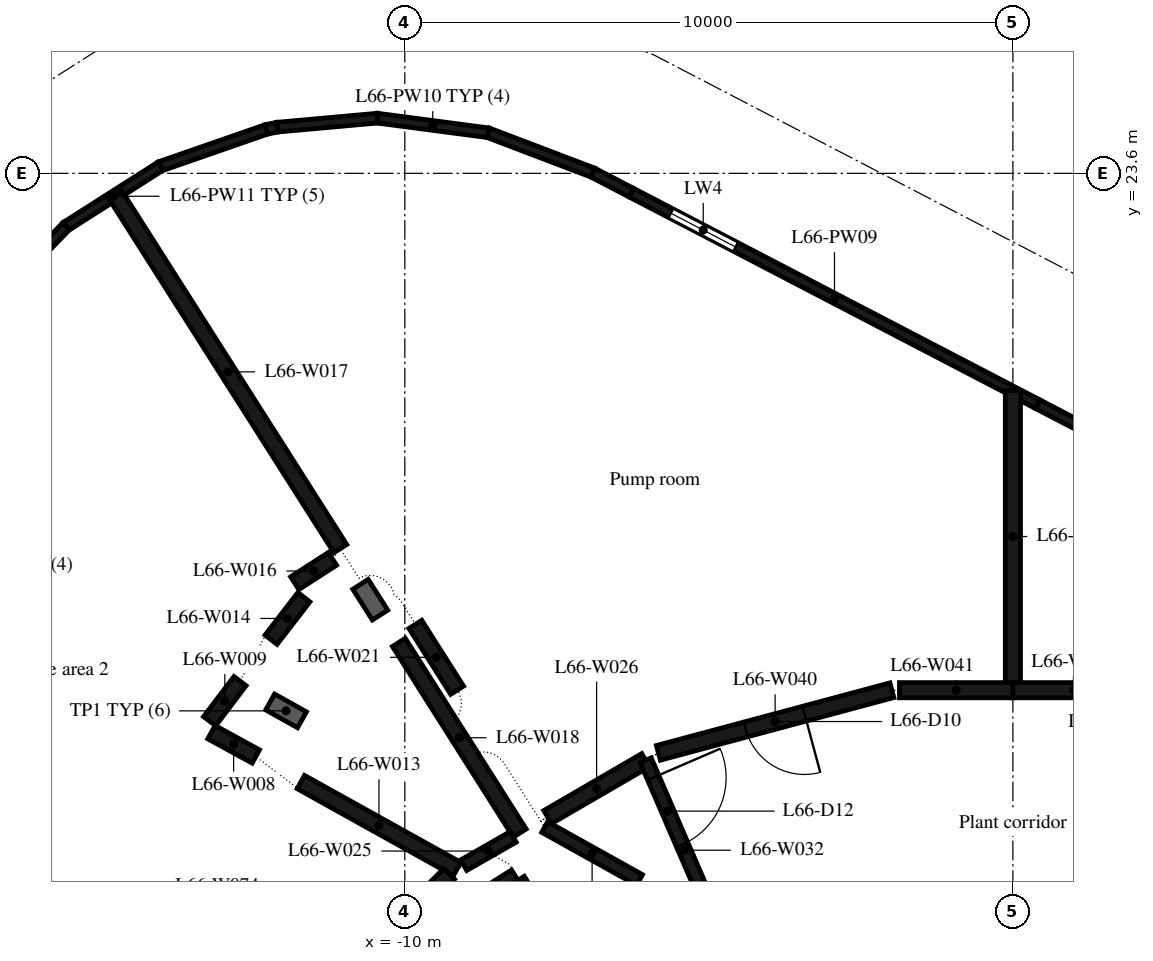
"""IFC4 building model, lengths in metres.
Left out: names, types, materials, properties, quantities, classifications, styles, units other than length and angle.
Written with IfcOpenShell. Run it as: python <this file> out.ifc"""

import sys

from ifc_helpers import new_model, si_unit, direction, frame, frame_2d, origin, place, context, subcontext, project, spatial, rectangle, extrude, element, fill, save


model = new_model("IFC4")
c1 = context("Model", 3, precision=1e-05, world=origin(), true_north=direction((0.0, 1.0)))
c2 = subcontext(c1, "Body", "Model", "MODEL_VIEW")
j1 = project(units=[si_unit("LENGTHUNIT", "METRE"), si_unit("PLANEANGLEUNIT", "RADIAN")], contexts=[c1])
p1 = place(None, origin())
s1 = spatial("IfcSite", under=j1, at=p1, CompositionType="ELEMENT")
p2 = place(p1, origin())
s2 = spatial("IfcBuilding", under=s1, at=p2, CompositionType="ELEMENT")
p3 = place(p2, frame((0.0, 0.0, 258.2)))
s3 = spatial("IfcBuildingStorey", under=s2, at=p3, CompositionType="ELEMENT", Elevation=258.2)
p4 = place(p3, frame((7.085, 16.328, 0.0), z_axis=(0.0, 0.0, 1.0), x_axis=(-0.887019775052, 0.46173143565, 0.0)))
e1 = element("IfcWall", 1, at=p4, inside=s3, PredefinedType="STANDARD", context=c2, shape_type="SweptSolid", body=[
    extrude(rectangle(XDim=7.53, YDim=0.16, at=frame_2d((3.765, 0.0))), origin(), (0.0, 0.0, 1.0), 4.75),
])
p5 = place(p4, frame((2.265, 0.0, 1.0)))
e2 = element("IfcOpeningElement", 2, at=p5, cuts=e1, PredefinedType="OPENING", context=c2, shape_type="SweptSolid", body=[
    extrude(rectangle(XDim=3.0, YDim=2.2, at=frame_2d((1.5, 1.1))), frame((0.0, 0.09, 0.0), z_axis=(0.0, -1.0, 0.0), x_axis=(1.0, 0.0, 0.0)), (0.0, 0.0, 1.0), 0.18),
])
p6 = place(p3, frame((0.406, 19.805, 0.0), z_axis=(0.0, 0.0, 1.0), x_axis=(-0.88700649569, 0.461756945377, 0.0)))
e3 = element("IfcWall", 3, at=p6, inside=s3, PredefinedType="STANDARD", context=c2, shape_type="SweptSolid", body=[
    extrude(rectangle(XDim=7.53, YDim=0.16, at=frame_2d((3.765, 0.0))), origin(), (0.0, 0.0, 1.0), 4.75),
])
p7 = place(p6, frame((5.598, 0.0, 1.0)))
e4 = element("IfcOpeningElement", 4, at=p7, cuts=e3, PredefinedType="OPENING", context=c2, shape_type="SweptSolid", body=[
    extrude(rectangle(XDim=1.2, YDim=2.2, at=frame_2d((0.6, 1.1))), frame((0.0, 0.09, 0.0), z_axis=(0.0, -1.0, 0.0), x_axis=(1.0, 0.0, 0.0)), (0.0, 0.0, 1.0), 0.18),
])
p8 = place(p3, frame((-6.274, 23.282, 0.0), z_axis=(0.0, 0.0, 1.0), x_axis=(-0.887061476856, 0.461651314607, 0.0)))
e5 = element("IfcWall", 5, at=p8, inside=s3, PredefinedType="STANDARD", context=c2, shape_type="SweptSolid", body=[
    extrude(rectangle(XDim=0.721, YDim=0.16, at=frame_2d((0.36, 0.0))), origin(), (0.0, 0.0, 1.0), 4.75),
])
p9 = place(p3, frame((-6.909, 23.613, 0.0), z_axis=(0.0, 0.0, 1.0), x_axis=(-0.934628033196, 0.355626826272, 0.0)))
e6 = element("IfcWall", 6, at=p9, inside=s3, PredefinedType="STANDARD", context=c2, shape_type="SweptSolid", body=[
    extrude(rectangle(XDim=1.846, YDim=0.16, at=frame_2d((0.923, 0.0))), origin(), (0.0, 0.0, 1.0), 4.75),
])
p10 = place(p3, frame((-8.625, 24.267, 0.0), z_axis=(0.0, 0.0, 1.0), x_axis=(-0.991428647281, 0.130649291427, 0.0)))
e7 = element("IfcWall", 7, at=p10, inside=s3, PredefinedType="STANDARD", context=c2, shape_type="SweptSolid", body=[
    extrude(rectangle(XDim=1.848, YDim=0.16, at=frame_2d((0.924, 0.0))), origin(), (0.0, 0.0, 1.0), 4.75),
])
p11 = place(p3, frame((-10.448, 24.508, 0.0), z_axis=(0.0, 0.0, 1.0), x_axis=(-0.995950985293, -0.089897913736, 0.0)))
e8 = element("IfcWall", 8, at=p11, inside=s3, PredefinedType="STANDARD", context=c2, shape_type="SweptSolid", body=[
    extrude(rectangle(XDim=1.656, YDim=0.16, at=frame_2d((0.828, 0.0))), origin(), (0.0, 0.0, 1.0), 4.75),
])
p12 = place(p3, frame((-12.098, 24.359, 0.0), z_axis=(0.0, 0.0, 1.0), x_axis=(-0.978969744076, -0.204005490574, 0.0)))
e9 = element("IfcWall", 9, at=p12, inside=s3, PredefinedType="STANDARD", context=c2, shape_type="SweptSolid", body=[
    extrude(rectangle(XDim=0.19, YDim=0.16, at=frame_2d((0.095, 0.0))), origin(), (0.0, 0.0, 1.0), 4.75),
])
p13 = place(p3, frame((-12.28, 24.322, 0.0), z_axis=(0.0, 0.0, 1.0), x_axis=(-0.944559218064, -0.328341108561, 0.0)))
e10 = element("IfcWall", 10, at=p13, inside=s3, PredefinedType="STANDARD", context=c2, shape_type="SweptSolid", body=[
    extrude(rectangle(XDim=1.846, YDim=0.16, at=frame_2d((0.923, 0.0))), origin(), (0.0, 0.0, 1.0), 4.75),
])
p14 = place(p3, frame((-14.015, 23.719, 0.0), z_axis=(0.0, 0.0, 1.0), x_axis=(-0.843373106488, -0.537328394236, 0.0)))
e11 = element("IfcWall", 11, at=p14, inside=s3, PredefinedType="STANDARD", context=c2, shape_type="SweptSolid", body=[
    extrude(rectangle(XDim=1.848, YDim=0.16, at=frame_2d((0.924, 0.0))), origin(), (0.0, 0.0, 1.0), 4.75),
])
p15 = place(p3, frame((-15.567, 22.732, 0.0), z_axis=(0.0, 0.0, 1.0), x_axis=(-0.696715693366, -0.71734736538, 0.0)))
e12 = element("IfcWall", 12, at=p15, inside=s3, PredefinedType="STANDARD", context=c2, shape_type="SweptSolid", body=[
    extrude(rectangle(XDim=1.846, YDim=0.16, at=frame_2d((0.923, 0.0))), origin(), (0.0, 0.0, 1.0), 4.75),
])
p16 = place(p3, frame((-13.18, 14.41, 0.0), z_axis=(0.0, 0.0, 1.0), x_axis=(0.877019761318, -0.480454304026, 0.0)))
e13 = element("IfcWall", 13, at=p16, inside=s3, PredefinedType="PARTITIONING", context=c2, shape_type="SweptSolid", body=[
    extrude(rectangle(XDim=0.832, YDim=0.25, at=frame_2d((0.416, 0.0))), origin(), (0.0, 0.0, 1.0), 4.75),
])
p17 = place(p3, frame((-12.71, 15.25, 0.0), z_axis=(0.0, 0.0, 1.0), x_axis=(-0.603908782769, -0.797053437415, 0.0)))
e14 = element("IfcWall", 14, at=p17, inside=s3, PredefinedType="PARTITIONING", context=c2, shape_type="SweptSolid", body=[
    extrude(rectangle(XDim=0.828, YDim=0.25, at=frame_2d((0.414, 0.0))), origin(), (0.0, 0.0, 1.0), 4.75),
])
p18 = place(p3, frame((-11.71, 13.59, 0.0), z_axis=(0.0, 0.0, 1.0), x_axis=(0.873816418471, -0.486255968406, 0.0)))
e15 = element("IfcWall", 15, at=p18, inside=s3, PredefinedType="PARTITIONING", context=c2, shape_type="SweptSolid", body=[
    extrude(rectangle(XDim=2.941, YDim=0.25, at=frame_2d((1.471, 0.0))), origin(), (0.0, 0.0, 1.0), 4.75),
])
p19 = place(p3, frame((-11.66, 16.63, 0.0), z_axis=(0.0, 0.0, 1.0), x_axis=(-0.610857864415, -0.791740279058, 0.0)))
e16 = element("IfcWall", 16, at=p19, inside=s3, PredefinedType="PARTITIONING", context=c2, shape_type="SweptSolid", body=[
    extrude(rectangle(XDim=0.884, YDim=0.25, at=frame_2d((0.442, 0.0))), origin(), (0.0, 0.0, 1.0), 4.75),
])
p20 = place(p3, frame((-11.19, 17.26, 0.0), z_axis=(0.0, 0.0, 1.0), x_axis=(-0.840403598602, -0.541961060831, 0.0)))
e17 = element("IfcWall", 17, at=p20, inside=s3, PredefinedType="PARTITIONING", context=c2, shape_type="SweptSolid", body=[
    extrude(rectangle(XDim=0.738, YDim=0.25, at=frame_2d((0.369, 0.0))), origin(), (0.0, 0.0, 1.0), 4.75),
])
p21 = place(p3, frame((-11.061, 17.429, 0.0), z_axis=(0.0, 0.0, 1.0), x_axis=(-0.536545243725, 0.843871555058, 0.0)))
e18 = element("IfcWall", 18, at=p21, inside=s3, PredefinedType="PARTITIONING", context=c2, shape_type="SweptSolid", body=[
    extrude(rectangle(XDim=6.889, YDim=0.25, at=frame_2d((3.445, 0.0))), origin(), (0.0, 0.0, 1.0), 4.75),
])
p22 = place(p3, frame((-10.098, 15.886, 0.0), z_axis=(0.0, 0.0, 1.0), x_axis=(0.535343000647, -0.844634756364, 0.0)))
e19 = element("IfcWall", 19, at=p22, inside=s3, PredefinedType="PARTITIONING", context=c2, shape_type="SweptSolid", body=[
    extrude(rectangle(XDim=3.713, YDim=0.25, at=frame_2d((1.856, 0.0))), origin(), (0.0, 0.0, 1.0), 4.75),
])
p23 = place(p3, frame((-9.27, 12.08, 0.0), z_axis=(0.0, 0.0, 1.0), x_axis=(-0.707106781187, -0.707106781187, 0.0)))
e20 = element("IfcWall", 20, at=p23, inside=s3, PredefinedType="PARTITIONING", context=c2, shape_type="SweptSolid", body=[
    extrude(rectangle(XDim=3.849, YDim=0.25, at=frame_2d((1.925, 0.0))), origin(), (0.0, 0.0, 1.0), 4.75),
])
p24 = place(p23, frame((1.425, 0.0, 0.0)))
e21 = element("IfcOpeningElement", 21, at=p24, cuts=e20, PredefinedType="OPENING", context=c2, shape_type="SweptSolid", body=[
    extrude(rectangle(XDim=1.0, YDim=2.1, at=frame_2d((0.5, 1.05))), frame((0.0, 0.135, 0.0), z_axis=(0.0, -1.0, 0.0), x_axis=(1.0, 0.0, 0.0)), (0.0, 0.0, 1.0), 0.27),
])
p25 = place(p3, frame((-9.14, 15.1, 0.0), z_axis=(0.0, 0.0, 1.0), x_axis=(-0.535889684675, 0.844288011202, 0.0)))
e22 = element("IfcWall", 22, at=p25, inside=s3, PredefinedType="PARTITIONING", context=c2, shape_type="SweptSolid", body=[
    extrude(rectangle(XDim=1.282, YDim=0.25, at=frame_2d((0.641, 0.0))), origin(), (0.0, 0.0, 1.0), 4.75),
])
p26 = place(p3, frame((-8.12, 11.986, 0.0), z_axis=(0.0, 0.0, 1.0), x_axis=(0.534054329683, -0.845450159943, 0.0)))
e23 = element("IfcWall", 23, at=p26, inside=s3, PredefinedType="PARTITIONING", context=c2, shape_type="SweptSolid", body=[
    extrude(rectangle(XDim=1.048, YDim=0.2, at=frame_2d((0.524, 0.0))), origin(), (0.0, 0.0, 1.0), 4.75),
])
p27 = place(p3, frame((-8.219, 12.688, 0.0), z_axis=(0.0, 0.0, 1.0), x_axis=(-0.867665313517, -0.497148774231, 0.0)))
e24 = element("IfcWall", 24, at=p27, inside=s3, PredefinedType="PARTITIONING", context=c2, shape_type="SweptSolid", body=[
    extrude(rectangle(XDim=0.937, YDim=0.2, at=frame_2d((0.469, 0.0))), origin(), (0.0, 0.0, 1.0), 4.75),
])
p28 = place(p3, frame((-7.652, 13.013, 0.0), z_axis=(0.0, 0.0, 1.0), x_axis=(0.864528358021, 0.50258404091, 0.0)))
e25 = element("IfcWall", 25, at=p28, inside=s3, PredefinedType="PARTITIONING", context=c2, shape_type="SweptSolid", body=[
    extrude(rectangle(XDim=1.865, YDim=0.25, at=frame_2d((0.932, 0.0))), origin(), (0.0, 0.0, 1.0), 4.75),
])
p29 = place(p3, frame((-6.14, 11.98, 0.0), z_axis=(0.0, 0.0, 1.0), x_axis=(-0.873343748456, 0.487104400547, 0.0)))
e26 = element("IfcWall", 26, at=p29, inside=s3, PredefinedType="PARTITIONING", context=c2, shape_type="SweptSolid", body=[
    extrude(rectangle(XDim=1.786, YDim=0.2, at=frame_2d((0.893, 0.0))), origin(), (0.0, 0.0, 1.0), 4.75),
])
p30 = place(p3, frame((-6.039, 13.948, 0.0), z_axis=(0.0, 0.0, 1.0), x_axis=(0.396897353622, -0.917863002135, 0.0)))
e27 = element("IfcWall", 27, at=p30, inside=s3, PredefinedType="PARTITIONING", context=c2, shape_type="SweptSolid", body=[
    extrude(rectangle(XDim=3.223, YDim=0.2, at=frame_2d((1.612, 0.0))), origin(), (0.0, 0.0, 1.0), 4.75),
])
p31 = place(p30, frame((0.312, 0.0, 0.0)))
e28 = element("IfcOpeningElement", 28, at=p31, cuts=e27, PredefinedType="OPENING", context=c2, shape_type="SweptSolid", body=[
    extrude(rectangle(XDim=1.2, YDim=2.1, at=frame_2d((0.6, 1.05))), frame((0.0, 0.11, 0.0), z_axis=(0.0, -1.0, 0.0), x_axis=(1.0, 0.0, 0.0)), (0.0, 0.0, 1.0), 0.22),
])
p32 = place(p3, frame((-1.99, 15.1, 0.0), z_axis=(0.0, 0.0, 1.0), x_axis=(-0.965857829358, -0.259072679895, 0.0)))
e29 = element("IfcWall", 29, at=p32, inside=s3, PredefinedType="PARTITIONING", context=c2, shape_type="SweptSolid", body=[
    extrude(rectangle(XDim=3.976, YDim=0.25, at=frame_2d((1.988, 0.0))), origin(), (0.0, 0.0, 1.0), 4.75),
])
p33 = place(p32, frame((1.488, 0.0, 0.0)))
e30 = element("IfcOpeningElement", 30, at=p33, cuts=e29, PredefinedType="OPENING", context=c2, shape_type="SweptSolid", body=[
    extrude(rectangle(XDim=1.0, YDim=2.1, at=frame_2d((0.5, 1.05))), frame((0.0, 0.135, 0.0), z_axis=(0.0, -1.0, 0.0), x_axis=(1.0, 0.0, 0.0)), (0.0, 0.0, 1.0), 0.27),
])
p34 = place(p3, frame((0.0, 15.1, 0.0), z_axis=(0.0, 0.0, 1.0), x_axis=(-1.0, 0.0, 0.0)))
e31 = element("IfcWall", 31, at=p34, inside=s3, PredefinedType="PARTITIONING", context=c2, shape_type="SweptSolid", body=[
    extrude(rectangle(XDim=1.865, YDim=0.25, at=frame_2d((0.933, 0.0))), origin(), (0.0, 0.0, 1.0), 4.75),
])
p35 = place(p3, frame((0.0, 15.225, 0.0), z_axis=(0.0, 0.0, 1.0), x_axis=(0.0, 1.0, 0.0)))
e32 = element("IfcWall", 32, at=p35, inside=s3, PredefinedType="PARTITIONING", context=c2, shape_type="SweptSolid", body=[
    extrude(rectangle(XDim=4.805, YDim=0.25, at=frame_2d((2.402, 0.0))), origin(), (0.0, 0.0, 1.0), 4.75),
])
p36 = place(p3, frame((1.99, 15.1, 0.0), z_axis=(0.0, 0.0, 1.0), x_axis=(-1.0, 0.0, 0.0)))
e33 = element("IfcWall", 33, at=p36, inside=s3, PredefinedType="PARTITIONING", context=c2, shape_type="SweptSolid", body=[
    extrude(rectangle(XDim=1.99, YDim=0.25, at=frame_2d((0.995, 0.0))), origin(), (0.0, 0.0, 1.0), 4.75),
])
p37 = place(p3, frame((-8.192, 12.059, 0.0), z_axis=(0.0, 0.0, 1.0), x_axis=(-0.845540263532, -0.533911661932, 0.0)))
e34 = element("IfcWall", 34, at=p37, inside=s3, PredefinedType="PARTITIONING", context=c2, shape_type="SweptSolid", body=[
    extrude(rectangle(XDim=0.678, YDim=0.2, at=frame_2d((0.339, 0.0))), origin(), (0.0, 0.0, 1.0), 4.75),
])
p38 = place(p7, origin())
e35 = element("IfcWindow", 35, at=p38, inside=s3, PartitioningType="SINGLE_PANEL", PredefinedType="WINDOW", context=c2, shape_type="SweptSolid", body=[
    extrude(rectangle(XDim=1.2, YDim=2.2, at=frame_2d((0.6, 1.1))), frame((0.0, 0.03, 0.0), z_axis=(0.0, -1.0, 0.0), x_axis=(1.0, 0.0, 0.0)), (0.0, 0.0, 1.0), 0.06),
])
fill(e4, e35)
p39 = place(p33, origin())
e36 = element("IfcDoor", 36, at=p39, inside=s3, OperationType="SINGLE_SWING_LEFT", PredefinedType="DOOR", context=c2, shape_type="SweptSolid", body=[
    extrude(rectangle(XDim=1.0, YDim=2.1, at=frame_2d((0.5, 1.05))), frame((0.0, 0.025, 0.0), z_axis=(0.0, -1.0, 0.0), x_axis=(1.0, 0.0, 0.0)), (0.0, 0.0, 1.0), 0.05),
])
fill(e30, e36)
p40 = place(p31, origin())
e37 = element("IfcDoor", 37, at=p40, inside=s3, OperationType="SINGLE_SWING_LEFT", PredefinedType="DOOR", context=c2, shape_type="SweptSolid", body=[
    extrude(rectangle(XDim=1.2, YDim=2.1, at=frame_2d((0.6, 1.05))), frame((0.0, 0.025, 0.0), z_axis=(0.0, -1.0, 0.0), x_axis=(1.0, 0.0, 0.0)), (0.0, 0.0, 1.0), 0.05),
])
fill(e28, e37)
save(model, sys.argv[1])
